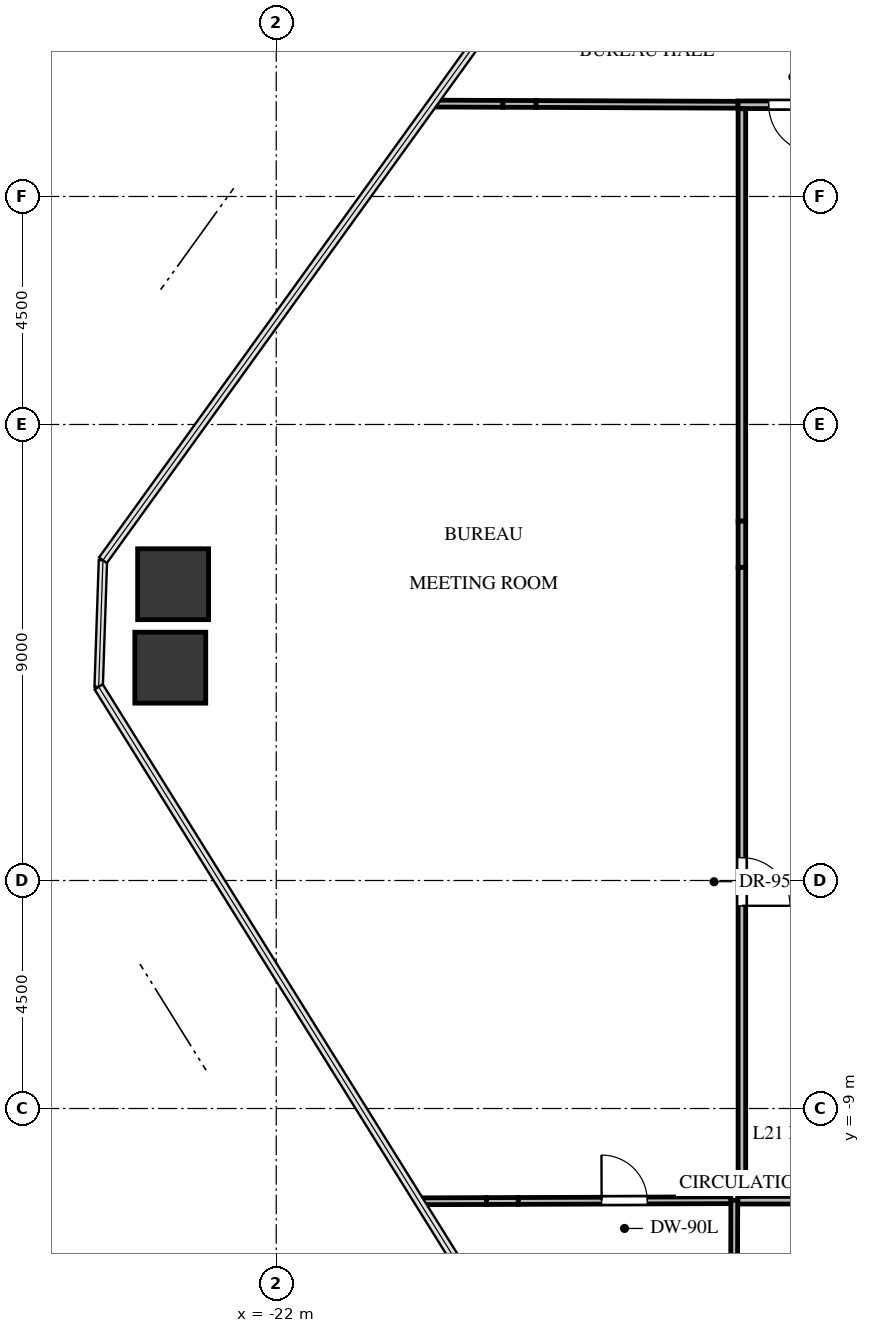
"""IFC4 building model, lengths in metres.
Left out: names, types, materials, properties, quantities, classifications, styles, units other than length and angle.
Written with IfcOpenShell. Run it as: python <this file> out.ifc"""

import sys

from ifc_helpers import new_model, si_unit, direction, frame, frame_2d, origin, origin_2d, place, context, subcontext, project, spatial, rectangle, extrude, source, transform, mapped, element, fill, save


model = new_model("IFC4")
c1 = context("Model", 3, precision=1e-05, world=origin(), true_north=direction((0.0, 1.0)))
c2 = subcontext(c1, "Body", "Model", "MODEL_VIEW")
j1 = project(units=[si_unit("LENGTHUNIT", "METRE"), si_unit("PLANEANGLEUNIT", "RADIAN")], contexts=[c1])
p1 = place(None, origin())
s1 = spatial("IfcSite", under=j1, at=p1, CompositionType="ELEMENT")
p2 = place(p1, origin())
s2 = spatial("IfcBuilding", under=s1, at=p2, CompositionType="ELEMENT")
p3 = place(p2, frame((0.0, 0.0, 81.3)))
s3 = spatial("IfcBuildingStorey", under=s2, at=p3, CompositionType="ELEMENT", Elevation=81.3)
m1 = source(origin(), c2, "Body", "SweptSolid", [
    extrude(rectangle(XDim=1.4, YDim=1.4, at=origin_2d()), origin(), (0.0, 0.0, 1.0), 3.0),
])
for number, where, z_axis, x_axis in (
    (1, (-24.091, -0.3, -0.24), (0.0, 0.0, 1.0), (1.0, 0.0, 0.0)),
    (2, (-24.035, 1.347, -0.24), (0.0, 0.0, 1.0), (1.0, 0.0, 0.0)),
):
    element("IfcColumn", number, at=place(p3, frame(where, z_axis=z_axis, x_axis=x_axis)), inside=s3, PredefinedType="COLUMN", context=c2, shape_type="MappedRepresentation", body=[
        mapped(m1, transform((0.0, 0.0, 0.0), x_axis=(1.0, 0.0, 0.0), y_axis=(0.0, 1.0, 0.0), z_axis=(0.0, 0.0, 1.0), scale=1.0)),
    ])
p4 = place(p3, frame((-10.72, 10.81, 0.0), z_axis=(0.0, 0.0, 1.0), x_axis=(-1.0, 0.0, 0.0)))
e3 = element("IfcWall", 3, at=p4, inside=s3, PredefinedType="PARTITIONING", context=c2, shape_type="SweptSolid", body=[
    extrude(rectangle(XDim=2.17, YDim=0.15, at=frame_2d((1.085, 0.0))), origin(), (0.0, 0.0, 1.0), 2.745),
])
p5 = place(p4, frame((0.61, 0.0, 0.0)))
e4 = element("IfcOpeningElement", 4, at=p5, cuts=e3, PredefinedType="OPENING", context=c2, shape_type="SweptSolid", body=[
    extrude(rectangle(XDim=0.95, YDim=2.1, at=frame_2d((0.475, 1.05))), frame((0.0, 0.085, 0.0), z_axis=(0.0, -1.0, 0.0), x_axis=(1.0, 0.0, 0.0)), (0.0, 0.0, 1.0), 0.17),
])
p6 = place(p3, frame((-12.89, -10.81, 0.0), z_axis=(0.0, 0.0, 1.0), x_axis=(1.0, 0.0, 0.0)))
e5 = element("IfcWall", 5, at=p6, inside=s3, PredefinedType="PARTITIONING", context=c2, shape_type="SweptSolid", body=[
    extrude(rectangle(XDim=6.768, YDim=0.15, at=frame_2d((3.384, 0.0))), origin(), (0.0, 0.0, 1.0), 1.83),
])
p7 = place(p3, frame((-12.81, 10.731, 0.0), z_axis=(0.0, 0.0, 1.0), x_axis=(0.0, -1.0, 0.0)))
e6 = element("IfcWall", 6, at=p7, inside=s3, PredefinedType="PARTITIONING", context=c2, shape_type="SweptSolid", body=[
    extrude(rectangle(XDim=8.139, YDim=0.15, at=frame_2d((4.069, 0.0))), origin(), (0.0, 0.0, 1.0), 2.745),
])
p8 = place(p3, frame((-12.81, 1.682, 0.0), z_axis=(0.0, 0.0, 1.0), x_axis=(0.0, -1.0, 0.0)))
e7 = element("IfcWall", 7, at=p8, inside=s3, PredefinedType="PARTITIONING", context=c2, shape_type="SweptSolid", body=[
    extrude(rectangle(XDim=12.413, YDim=0.15, at=frame_2d((6.207, 0.0))), origin(), (0.0, 0.0, 1.0), 2.745),
])
p9 = place(p8, frame((5.732, 0.0, 0.0)))
e8 = element("IfcOpeningElement", 8, at=p9, cuts=e7, PredefinedType="OPENING", context=c2, shape_type="SweptSolid", body=[
    extrude(rectangle(XDim=0.95, YDim=2.1, at=frame_2d((0.475, 1.05))), frame((0.0, 0.085, 0.0), z_axis=(0.0, -1.0, 0.0), x_axis=(1.0, 0.0, 0.0)), (0.0, 0.0, 1.0), 0.17),
])
p10 = place(p3, frame((-12.81, 2.592, 0.0), z_axis=(0.0, 0.0, 1.0), x_axis=(0.0, -1.0, 0.0)))
e9 = element("IfcWall", 9, at=p10, inside=s3, PredefinedType="PARTITIONING", context=c2, shape_type="SweptSolid", body=[
    extrude(rectangle(XDim=0.91, YDim=0.15, at=frame_2d((0.455, 0.0))), origin(), (0.0, 0.0, 1.0), 1.83),
])
p11 = place(p3, frame((-12.89, 10.81, 0.0), z_axis=(0.0, 0.0, 1.0), x_axis=(-0.999992552799, 0.003859319458, 0.0)))
e10 = element("IfcWall", 10, at=p11, inside=s3, PredefinedType="PARTITIONING", context=c2, shape_type="SweptSolid", body=[
    extrude(rectangle(XDim=3.985, YDim=0.135, at=frame_2d((1.993, 0.0))), origin(), (0.0, 0.0, 1.0), 2.745),
])
p12 = place(p3, frame((-17.526, 10.828, 0.0), z_axis=(0.0, 0.0, 1.0), x_axis=(-0.999992598457, 0.003847470648, 0.0)))
e11 = element("IfcWall", 11, at=p12, inside=s3, PredefinedType="PARTITIONING", context=c2, shape_type="SweptSolid", body=[
    extrude(rectangle(XDim=1.396, YDim=0.135, at=frame_2d((0.698, 0.0))), origin(), (0.0, 0.0, 1.0), 2.745),
])
p13 = place(p3, frame((-16.875, 10.826, 0.0), z_axis=(0.0, 0.0, 1.0), x_axis=(-0.999992960027, 0.003752318799, 0.0)))
e12 = element("IfcWall", 12, at=p13, inside=s3, PredefinedType="PARTITIONING", context=c2, shape_type="SweptSolid", body=[
    extrude(rectangle(XDim=0.651, YDim=0.135, at=frame_2d((0.325, 0.0))), origin(), (0.0, 0.0, 1.0), 2.08),
])
p14 = place(p3, frame((-12.96, -10.81, 0.0), z_axis=(0.0, 0.0, 1.0), x_axis=(-0.002177166658, -0.99999762997, 0.0)))
e13 = element("IfcWall", 13, at=p14, inside=s3, PredefinedType="PARTITIONING", context=c2, shape_type="SweptSolid", body=[
    extrude(rectangle(XDim=6.84, YDim=0.135, at=frame_2d((3.42, 0.0))), origin(), (0.0, 0.0, 1.0), 2.08),
])
p15 = place(p3, frame((-19.182, -10.831, 0.0), z_axis=(0.0, 0.0, 1.0), x_axis=(0.99999396086, 0.003475376853, 0.0)))
e14 = element("IfcWall", 14, at=p15, inside=s3, PredefinedType="PARTITIONING", context=c2, shape_type="SweptSolid", body=[
    extrude(rectangle(XDim=1.335, YDim=0.135, at=frame_2d((0.667, 0.0))), origin(), (0.0, 0.0, 1.0), 2.745),
])
p16 = place(p3, frame((-17.225, -10.824, 0.0), z_axis=(0.0, 0.0, 1.0), x_axis=(0.999994299971, 0.003376392444, 0.0)))
e15 = element("IfcWall", 15, at=p16, inside=s3, PredefinedType="PARTITIONING", context=c2, shape_type="SweptSolid", body=[
    extrude(rectangle(XDim=4.194, YDim=0.135, at=frame_2d((2.097, 0.0))), origin(), (0.0, 0.0, 1.0), 2.745),
])
p17 = place(p16, frame((1.647, 0.0, 0.0)))
e16 = element("IfcOpeningElement", 16, at=p17, cuts=e15, PredefinedType="OPENING", context=c2, shape_type="SweptSolid", body=[
    extrude(rectangle(XDim=0.9, YDim=2.05, at=frame_2d((0.45, 1.025))), frame((0.0, 0.078, 0.0), z_axis=(0.0, -1.0, 0.0), x_axis=(1.0, 0.0, 0.0)), (0.0, 0.0, 1.0), 0.155),
])
p18 = place(p3, frame((-17.847, -10.827, 0.0), z_axis=(0.0, 0.0, 1.0), x_axis=(0.999993761903, 0.00353216007, 0.0)))
e17 = element("IfcWall", 17, at=p18, inside=s3, PredefinedType="PARTITIONING", context=c2, shape_type="SweptSolid", body=[
    extrude(rectangle(XDim=0.622, YDim=0.135, at=frame_2d((0.311, 0.0))), origin(), (0.0, 0.0, 1.0), 2.08),
])
m2 = source(origin(), c2, "Body", "SweptSolid", [
    extrude(rectangle(XDim=0.95, YDim=2.1, at=frame_2d((0.475, 1.05))), frame((0.0, 0.025, 0.0), z_axis=(0.0, -1.0, 0.0), x_axis=(1.0, 0.0, 0.0)), (0.0, 0.0, 1.0), 0.05),
])
p19 = place(p5, origin())
e18 = element("IfcDoor", 18, at=p19, inside=s3, OperationType="SINGLE_SWING_LEFT", PredefinedType="DOOR", context=c2, shape_type="MappedRepresentation", body=[
    mapped(m2, transform((0.0, 0.0, 0.0), x_axis=(1.0, 0.0, 0.0), y_axis=(0.0, 1.0, 0.0), z_axis=(0.0, 0.0, 1.0), scale=1.0)),
])
fill(e4, e18)
m3 = source(origin(), c2, "Body", "SweptSolid", [
    extrude(rectangle(XDim=0.95, YDim=2.1, at=frame_2d((0.475, 1.05))), frame((0.0, 0.025, 0.0), z_axis=(0.0, -1.0, 0.0), x_axis=(1.0, 0.0, 0.0)), (0.0, 0.0, 1.0), 0.05),
])
p20 = place(p9, origin())
e19 = element("IfcDoor", 19, at=p20, inside=s3, OperationType="SINGLE_SWING_RIGHT", PredefinedType="DOOR", context=c2, shape_type="MappedRepresentation", body=[
    mapped(m3, transform((0.0, 0.0, 0.0), x_axis=(1.0, 0.0, 0.0), y_axis=(0.0, 1.0, 0.0), z_axis=(0.0, 0.0, 1.0), scale=1.0)),
])
fill(e8, e19)
m4 = source(origin(), c2, "Body", "SweptSolid", [
    extrude(rectangle(XDim=0.9, YDim=2.05, at=frame_2d((0.45, 1.025))), frame((0.0, 0.025, 0.0), z_axis=(0.0, -1.0, 0.0), x_axis=(1.0, 0.0, 0.0)), (0.0, 0.0, 1.0), 0.05),
])
p21 = place(p17, origin())
e20 = element("IfcDoor", 20, at=p21, inside=s3, OperationType="SINGLE_SWING_LEFT", PredefinedType="DOOR", context=c2, shape_type="MappedRepresentation", body=[
    mapped(m4, transform((0.0, 0.0, 0.0), x_axis=(1.0, 0.0, 0.0), y_axis=(0.0, 1.0, 0.0), z_axis=(0.0, 0.0, 1.0), scale=1.0)),
])
fill(e16, e20)
save(model, sys.argv[1])
